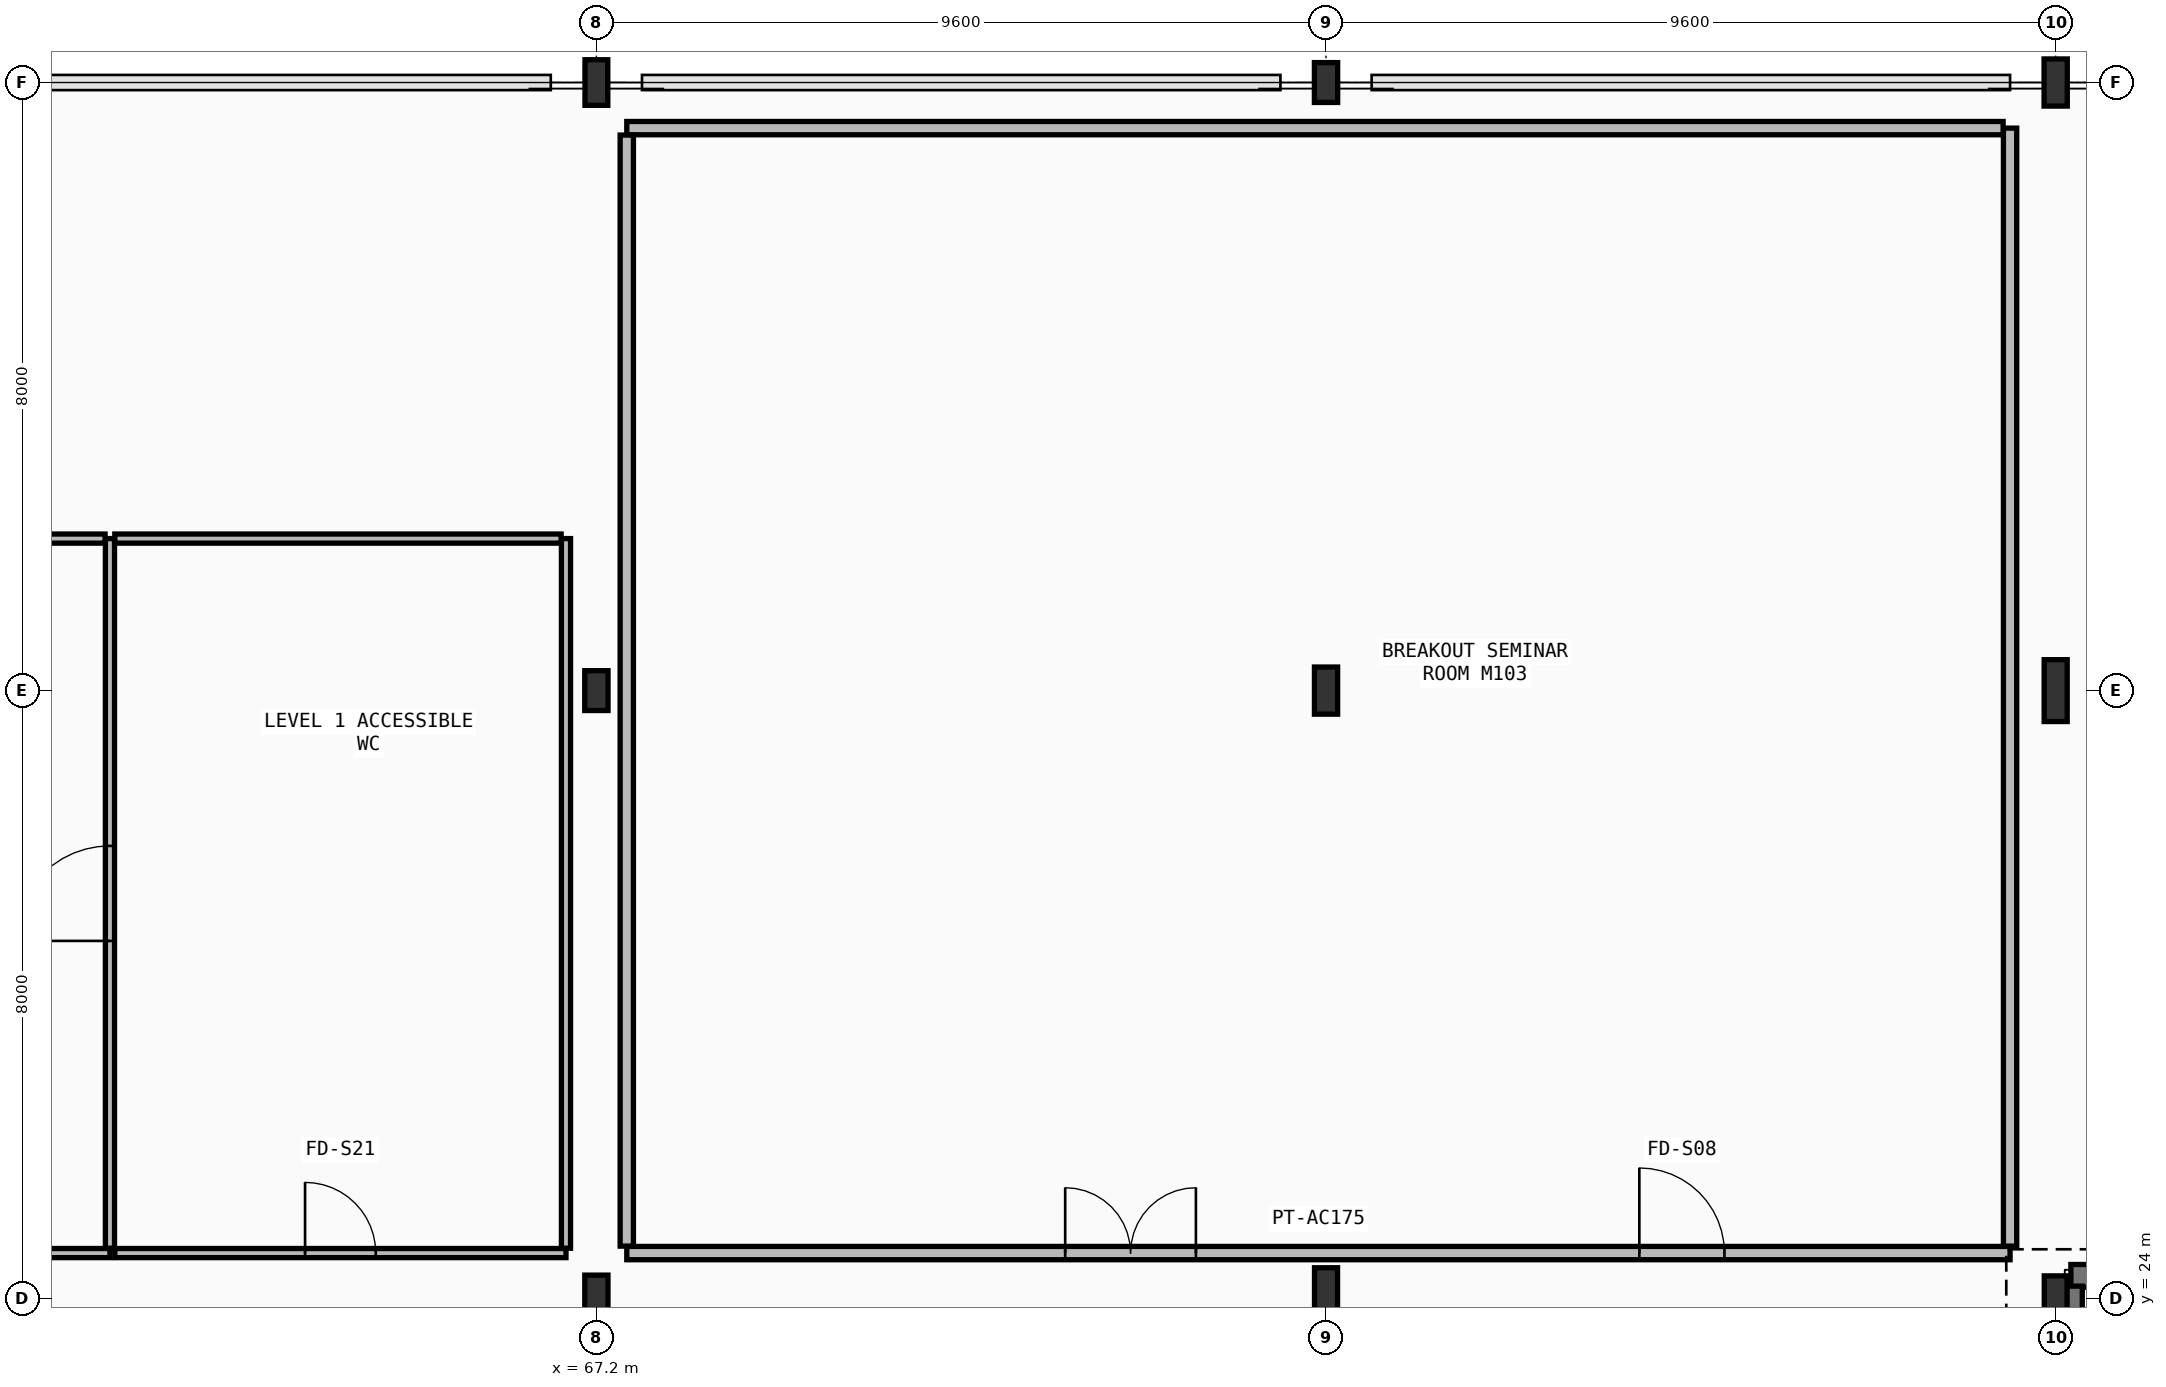
"""IFC4 building model, lengths in metres.
Left out: names, types, materials, properties, quantities, classifications, styles, units other than length and angle.
Written with IfcOpenShell. Run it as: python <this file> out.ifc"""

import sys

from ifc_helpers import new_model, si_unit, direction, frame, frame_2d, origin, origin_2d, place, context, subcontext, project, spatial, rectangle, i_section, extrude, element, fill, save


model = new_model("IFC4")
c1 = context("Model", 3, precision=1e-05, world=origin(), true_north=direction((0.0, 1.0)))
c2 = subcontext(c1, "Body", "Model", "MODEL_VIEW")
j1 = project(units=[si_unit("LENGTHUNIT", "METRE"), si_unit("PLANEANGLEUNIT", "RADIAN")], contexts=[c1])
p1 = place(None, origin())
s1 = spatial("IfcSite", under=j1, at=p1, CompositionType="ELEMENT")
p2 = place(p1, origin())
s2 = spatial("IfcBuilding", under=s1, at=p2, CompositionType="ELEMENT")
p3 = place(p2, frame((0.0, 0.0, 6.0)))
s3 = spatial("IfcBuildingStorey", under=s2, at=p3, CompositionType="ELEMENT", Elevation=6.0)
p4 = place(p3, frame((67.2, 24.0, 0.0), z_axis=(0.0, 0.0, 1.0), x_axis=(1.0, 0.0, 0.0)))
e1 = element("IfcColumn", 1, at=p4, inside=s3, PredefinedType="COLUMN", context=c2, shape_type="SweptSolid", body=[
    extrude(i_section(OverallWidth=0.305, OverallDepth=0.62, WebThickness=0.021, FlangeThickness=0.04, FilletRadius=0.027, at=origin_2d()), origin(), (0.0, 0.0, 1.0), 5.4),
])
p5 = place(p3, frame((67.2, 32.0, 0.0), z_axis=(0.0, 0.0, 1.0), x_axis=(1.0, 0.0, 0.0)))
e2 = element("IfcColumn", 2, at=p5, inside=s3, PredefinedType="COLUMN", context=c2, shape_type="SweptSolid", body=[
    extrude(i_section(OverallWidth=0.306, OverallDepth=0.524, WebThickness=0.021, FlangeThickness=0.04, FilletRadius=0.027, at=origin_2d()), origin(), (0.0, 0.0, 1.0), 5.4),
])
p6 = place(p3, frame((67.2, 40.0, 0.0), z_axis=(0.0, 0.0, 1.0), x_axis=(1.0, 0.0, 0.0)))
e3 = element("IfcColumn", 3, at=p6, inside=s3, PredefinedType="COLUMN", context=c2, shape_type="SweptSolid", body=[
    extrude(i_section(OverallWidth=0.3, OverallDepth=0.6, WebThickness=0.015, FlangeThickness=0.03, FilletRadius=0.027, at=origin_2d()), origin(), (0.0, 0.0, 1.0), 5.4),
])
p7 = place(p3, frame((76.8, 24.0, 0.0), z_axis=(0.0, 0.0, 1.0), x_axis=(1.0, 0.0, 0.0)))
e4 = element("IfcColumn", 4, at=p7, inside=s3, PredefinedType="COLUMN", context=c2, shape_type="SweptSolid", body=[
    extrude(i_section(OverallWidth=0.303, OverallDepth=0.814, WebThickness=0.021, FlangeThickness=0.04, FilletRadius=0.03, at=origin_2d()), origin(), (0.0, 0.0, 1.0), 5.4),
])
p8 = place(p3, frame((76.8, 32.0, 0.0), z_axis=(0.0, 0.0, 1.0), x_axis=(1.0, 0.0, 0.0)))
e5 = element("IfcColumn", 5, at=p8, inside=s3, PredefinedType="COLUMN", context=c2, shape_type="SweptSolid", body=[
    extrude(i_section(OverallWidth=0.305, OverallDepth=0.62, WebThickness=0.021, FlangeThickness=0.04, FilletRadius=0.027, at=origin_2d()), origin(), (0.0, 0.0, 1.0), 5.4),
])
p9 = place(p3, frame((76.8, 40.0, 0.0), z_axis=(0.0, 0.0, 1.0), x_axis=(1.0, 0.0, 0.0)))
e6 = element("IfcColumn", 6, at=p9, inside=s3, PredefinedType="COLUMN", context=c2, shape_type="SweptSolid", body=[
    extrude(i_section(OverallWidth=0.306, OverallDepth=0.524, WebThickness=0.021, FlangeThickness=0.04, FilletRadius=0.027, at=origin_2d()), origin(), (0.0, 0.0, 1.0), 5.4),
])
p10 = place(p3, frame((86.4, 24.0, 0.0), z_axis=(0.0, 0.0, 1.0), x_axis=(1.0, 0.0, 0.0)))
e7 = element("IfcColumn", 7, at=p10, inside=s3, PredefinedType="COLUMN", context=c2, shape_type="SweptSolid", body=[
    extrude(i_section(OverallWidth=0.3, OverallDepth=0.6, WebThickness=0.015, FlangeThickness=0.03, FilletRadius=0.027, at=origin_2d()), origin(), (0.0, 0.0, 1.0), 5.4),
])
p11 = place(p3, frame((86.4, 32.0, 0.0), z_axis=(0.0, 0.0, 1.0), x_axis=(1.0, 0.0, 0.0)))
e8 = element("IfcColumn", 8, at=p11, inside=s3, PredefinedType="COLUMN", context=c2, shape_type="SweptSolid", body=[
    extrude(i_section(OverallWidth=0.303, OverallDepth=0.814, WebThickness=0.021, FlangeThickness=0.04, FilletRadius=0.03, at=origin_2d()), origin(), (0.0, 0.0, 1.0), 5.4),
])
p12 = place(p3, frame((86.4, 40.0, 0.0), z_axis=(0.0, 0.0, 1.0), x_axis=(1.0, 0.0, 0.0)))
e9 = element("IfcColumn", 9, at=p12, inside=s3, PredefinedType="COLUMN", context=c2, shape_type="SweptSolid", body=[
    extrude(i_section(OverallWidth=0.305, OverallDepth=0.62, WebThickness=0.021, FlangeThickness=0.04, FilletRadius=0.027, at=origin_2d()), origin(), (0.0, 0.0, 1.0), 5.4),
])
p13 = place(p3, frame((89.2, 24.3, 0.0), z_axis=(0.0, 0.0, 1.0), x_axis=(-1.0, 0.0, 0.0)))
e10 = element("IfcWall", 10, at=p13, inside=s3, PredefinedType="SHEAR", context=c2, shape_type="SweptSolid", body=[
    extrude(rectangle(XDim=2.6, YDim=0.3, at=frame_2d((1.3, 0.0))), origin(), (0.0, 0.0, 1.0), 5.15),
])
p14 = place(p3, frame((86.6, 24.165, 0.0), z_axis=(0.0, 0.0, 1.0), x_axis=(0.0, -1.0, 0.0)))
e11 = element("IfcWall", 11, at=p14, inside=s3, PredefinedType="SHEAR", context=c2, shape_type="SweptSolid", body=[
    extrude(rectangle(XDim=2.5, YDim=0.3, at=frame_2d((1.25, 0.0))), origin(), (0.0, 0.0, 1.0), 5.15),
])
p15 = place(p3, frame((67.6, 24.6, 0.0), z_axis=(0.0, 0.0, 1.0), x_axis=(1.0, 0.0, 0.0)))
e12 = element("IfcWall", 12, at=p15, inside=s3, PredefinedType="PARTITIONING", context=c2, shape_type="SweptSolid", body=[
    extrude(rectangle(XDim=18.2, YDim=0.175, at=frame_2d((9.1, 0.0))), origin(), (0.0, 0.0, 1.0), 4.52),
])
p16 = place(p15, frame((5.768, 0.0, 0.0)))
e13 = element("IfcOpeningElement", 13, at=p16, cuts=e12, PredefinedType="OPENING", context=c2, shape_type="SweptSolid", body=[
    extrude(rectangle(XDim=1.72, YDim=2.24, at=frame_2d((0.86, 1.12))), frame((0.0, 0.097, 0.0), z_axis=(0.0, -1.0, 0.0), x_axis=(1.0, 0.0, 0.0)), (0.0, 0.0, 1.0), 0.195),
])
p17 = place(p15, frame((13.322, 0.0, 0.0)))
e14 = element("IfcOpeningElement", 14, at=p17, cuts=e12, PredefinedType="OPENING", context=c2, shape_type="SweptSolid", body=[
    extrude(rectangle(XDim=1.12, YDim=2.2, at=frame_2d((0.56, 1.1))), frame((0.0, 0.097, 0.0), z_axis=(0.0, -1.0, 0.0), x_axis=(1.0, 0.0, 0.0)), (0.0, 0.0, 1.0), 0.195),
])
p18 = place(p3, frame((85.8, 24.691, 0.0), z_axis=(0.0, 0.0, 1.0), x_axis=(0.0, 1.0, 0.0)))
e15 = element("IfcWall", 15, at=p18, inside=s3, PredefinedType="PARTITIONING", context=c2, shape_type="SweptSolid", body=[
    extrude(rectangle(XDim=14.708, YDim=0.175, at=frame_2d((7.354, 0.0))), origin(), (0.0, 0.0, 1.0), 4.57),
])
p19 = place(p3, frame((85.708, 39.4, 0.0), z_axis=(0.0, 0.0, 1.0), x_axis=(-1.0, 0.0, 0.0)))
e16 = element("IfcWall", 16, at=p19, inside=s3, PredefinedType="PARTITIONING", context=c2, shape_type="SweptSolid", body=[
    extrude(rectangle(XDim=18.108, YDim=0.175, at=frame_2d((9.054, 0.0))), origin(), (0.0, 0.0, 1.0), 4.62),
])
p20 = place(p3, frame((67.6, 39.309, 0.0), z_axis=(0.0, 0.0, 1.0), x_axis=(0.0, -1.0, 0.0)))
e17 = element("IfcWall", 17, at=p20, inside=s3, PredefinedType="PARTITIONING", context=c2, shape_type="SweptSolid", body=[
    extrude(rectangle(XDim=14.617, YDim=0.175, at=frame_2d((7.309, 0.0))), origin(), (0.0, 0.0, 1.0), 4.52),
])
p21 = place(p3, frame((54.546, 24.6, 0.0), z_axis=(0.0, 0.0, 1.0), x_axis=(1.0, 0.0, 0.0)))
e18 = element("IfcWall", 18, at=p21, inside=s3, PredefinedType="PARTITIONING", context=c2, shape_type="SweptSolid", body=[
    extrude(rectangle(XDim=6.254, YDim=0.12, at=frame_2d((3.127, 0.0))), origin(), (0.0, 0.0, 1.0), 4.22),
])
p22 = place(p3, frame((60.8, 24.664, 0.0), z_axis=(0.0, 0.0, 1.0), x_axis=(0.0, 1.0, 0.0)))
e19 = element("IfcWall", 19, at=p22, inside=s3, PredefinedType="PARTITIONING", context=c2, shape_type="SweptSolid", body=[
    extrude(rectangle(XDim=9.336, YDim=0.12, at=frame_2d((4.668, 0.0))), origin(), (0.0, 0.0, 1.0), 4.42),
])
p23 = place(p22, frame((4.043, 0.0, 0.0)))
e20 = element("IfcOpeningElement", 20, at=p23, cuts=e19, PredefinedType="OPENING", context=c2, shape_type="SweptSolid", body=[
    extrude(rectangle(XDim=1.25, YDim=2.38, at=frame_2d((0.625, 1.19))), frame((0.0, 0.07, 0.0), z_axis=(0.0, -1.0, 0.0), x_axis=(1.0, 0.0, 0.0)), (0.0, 0.0, 1.0), 0.14),
])
p24 = place(p3, frame((60.736, 34.0, 0.0), z_axis=(0.0, 0.0, 1.0), x_axis=(-1.0, 0.0, 0.0)))
e21 = element("IfcWall", 21, at=p24, inside=s3, PredefinedType="PARTITIONING", context=c2, shape_type="SweptSolid", body=[
    extrude(rectangle(XDim=6.19, YDim=0.12, at=frame_2d((3.095, 0.0))), origin(), (0.0, 0.0, 1.0), 4.42),
])
p25 = place(p3, frame((60.864, 24.6, 0.0), z_axis=(0.0, 0.0, 1.0), x_axis=(1.0, 0.0, 0.0)))
e22 = element("IfcWall", 22, at=p25, inside=s3, PredefinedType="PARTITIONING", context=c2, shape_type="SweptSolid", body=[
    extrude(rectangle(XDim=5.936, YDim=0.12, at=frame_2d((2.968, 0.0))), origin(), (0.0, 0.0, 1.0), 5.15),
])
p26 = place(p25, frame((2.503, 0.0, 0.0)))
e23 = element("IfcOpeningElement", 23, at=p26, cuts=e22, PredefinedType="OPENING", context=c2, shape_type="SweptSolid", body=[
    extrude(rectangle(XDim=0.93, YDim=2.22, at=frame_2d((0.465, 1.11))), frame((0.0, 0.07, 0.0), z_axis=(0.0, -1.0, 0.0), x_axis=(1.0, 0.0, 0.0)), (0.0, 0.0, 1.0), 0.14),
])
p27 = place(p3, frame((66.8, 24.664, 0.0), z_axis=(0.0, 0.0, 1.0), x_axis=(0.0, 1.0, 0.0)))
e24 = element("IfcWall", 24, at=p27, inside=s3, PredefinedType="PARTITIONING", context=c2, shape_type="SweptSolid", body=[
    extrude(rectangle(XDim=9.336, YDim=0.12, at=frame_2d((4.668, 0.0))), origin(), (0.0, 0.0, 1.0), 4.42),
])
p28 = place(p3, frame((66.736, 34.0, 0.0), z_axis=(0.0, 0.0, 1.0), x_axis=(-1.0, 0.0, 0.0)))
e25 = element("IfcWall", 25, at=p28, inside=s3, PredefinedType="PARTITIONING", context=c2, shape_type="SweptSolid", body=[
    extrude(rectangle(XDim=5.872, YDim=0.12, at=frame_2d((2.936, 0.0))), origin(), (0.0, 0.0, 1.0), 5.15),
])
p29 = place(p16, origin())
e26 = element("IfcDoor", 26, at=p29, inside=s3, OperationType="DOUBLE_DOOR_SINGLE_SWING", PredefinedType="DOOR", context=c2, shape_type="SweptSolid", body=[
    extrude(rectangle(XDim=1.72, YDim=2.24, at=frame_2d((0.86, 1.12))), frame((0.0, 0.025, 0.0), z_axis=(0.0, -1.0, 0.0), x_axis=(1.0, 0.0, 0.0)), (0.0, 0.0, 1.0), 0.05),
])
fill(e13, e26)
p30 = place(p17, origin())
e27 = element("IfcDoor", 27, at=p30, inside=s3, OperationType="SINGLE_SWING_LEFT", PredefinedType="DOOR", context=c2, shape_type="SweptSolid", body=[
    extrude(rectangle(XDim=1.12, YDim=2.2, at=frame_2d((0.56, 1.1))), frame((0.0, 0.025, 0.0), z_axis=(0.0, -1.0, 0.0), x_axis=(1.0, 0.0, 0.0)), (0.0, 0.0, 1.0), 0.05),
])
fill(e14, e27)
p31 = place(p23, origin())
e28 = element("IfcDoor", 28, at=p31, inside=s3, OperationType="SINGLE_SWING_RIGHT", PredefinedType="DOOR", context=c2, shape_type="SweptSolid", body=[
    extrude(rectangle(XDim=1.25, YDim=2.38, at=frame_2d((0.625, 1.19))), frame((0.0, 0.025, 0.0), z_axis=(0.0, -1.0, 0.0), x_axis=(1.0, 0.0, 0.0)), (0.0, 0.0, 1.0), 0.05),
])
fill(e20, e28)
p32 = place(p26, origin())
e29 = element("IfcDoor", 29, at=p32, inside=s3, OperationType="SINGLE_SWING_LEFT", PredefinedType="DOOR", context=c2, shape_type="SweptSolid", body=[
    extrude(rectangle(XDim=0.93, YDim=2.22, at=frame_2d((0.465, 1.11))), frame((0.0, 0.025, 0.0), z_axis=(0.0, -1.0, 0.0), x_axis=(1.0, 0.0, 0.0)), (0.0, 0.0, 1.0), 0.05),
])
fill(e23, e29)
save(model, sys.argv[1])
